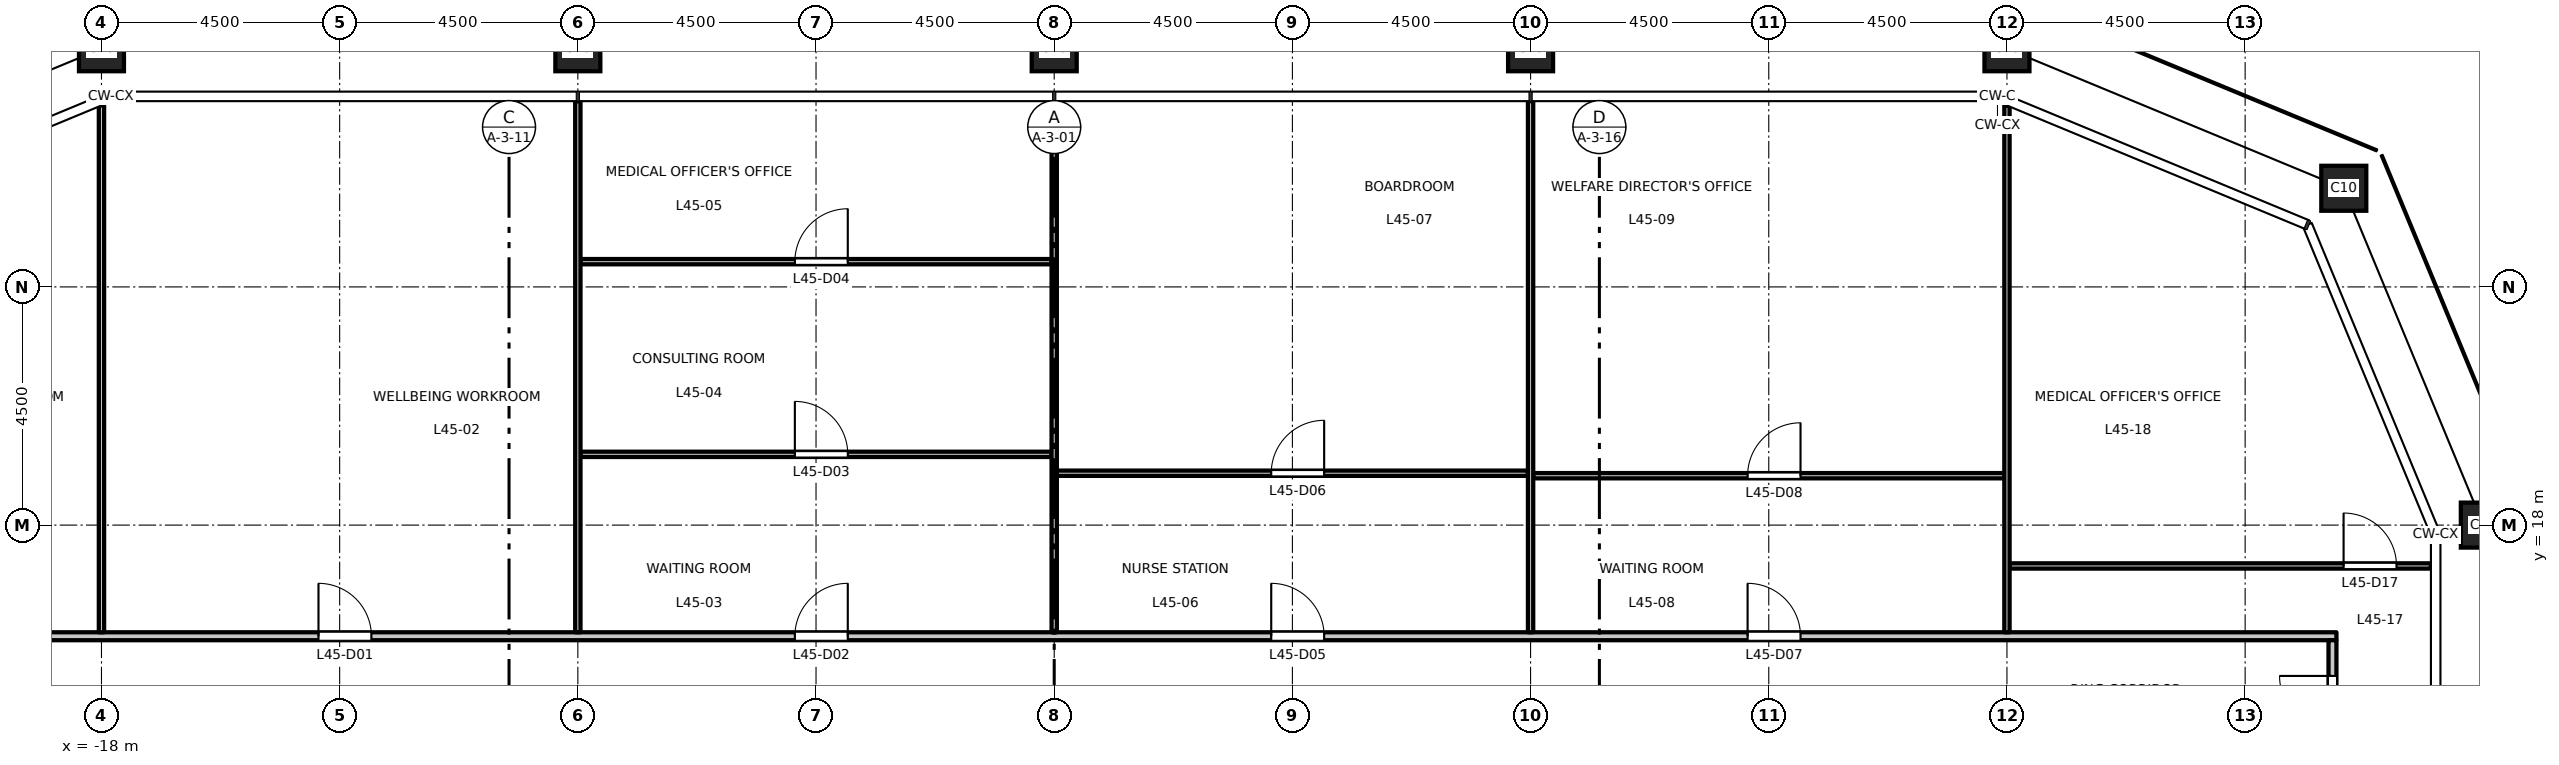
"""IFC4 building model, lengths in metres.
Left out: names, types, materials, properties, quantities, classifications, styles, units other than length and angle.
Written with IfcOpenShell. Run it as: python <this file> out.ifc"""

import sys

from ifc_helpers import new_model, si_unit, direction, frame, frame_2d, origin, origin_2d, place, context, subcontext, project, spatial, rectangle, hollow_rectangle, extrude, element, fill, save


model = new_model("IFC4")
c1 = context("Model", 3, precision=1e-05, world=origin(), true_north=direction((0.0, 1.0)))
c2 = subcontext(c1, "Body", "Model", "MODEL_VIEW")
j1 = project(units=[si_unit("LENGTHUNIT", "METRE"), si_unit("PLANEANGLEUNIT", "RADIAN")], contexts=[c1])
p1 = place(None, origin())
s1 = spatial("IfcSite", under=j1, at=p1, CompositionType="ELEMENT")
p2 = place(p1, origin())
s2 = spatial("IfcBuilding", under=s1, at=p2, CompositionType="ELEMENT")
p3 = place(p2, frame((0.0, 0.0, 210.7)))
s3 = spatial("IfcBuildingStorey", under=s2, at=p3, CompositionType="ELEMENT", Elevation=210.7)
for number, where, z_axis, x_axis in (
    (1, (27.0, 18.0, 0.0), (0.0, 0.0, 1.0), (1.0, 0.0, 0.0)),
    (2, (24.364, 24.364, 0.0), (0.0, 0.0, 1.0), (1.0, 0.0, 0.0)),
    (3, (18.0, 27.0, 0.0), (0.0, 0.0, 1.0), (1.0, 0.0, 0.0)),
    (4, (9.0, 27.0, 0.0), (0.0, 0.0, 1.0), (1.0, 0.0, 0.0)),
    (5, (0.0, 27.0, 0.0), (0.0, 0.0, 1.0), (1.0, 0.0, 0.0)),
    (6, (-9.0, 27.0, 0.0), (0.0, 0.0, 1.0), (1.0, 0.0, 0.0)),
    (7, (-18.0, 27.0, 0.0), (0.0, 0.0, 1.0), (1.0, 0.0, 0.0)),
):
    element("IfcColumn", number, at=place(p3, frame(where, z_axis=z_axis, x_axis=x_axis)), inside=s3, PredefinedType="COLUMN", context=c2, shape_type="SweptSolid", body=[
        extrude(hollow_rectangle(XDim=0.85, YDim=0.85, WallThickness=0.05, at=origin_2d()), origin(), (0.0, 0.0, 1.0), 4.5),
    ])
p4 = place(p3, frame((-24.225, 15.9, 0.0), z_axis=(0.0, 0.0, 1.0), x_axis=(1.0, 0.0, 0.0)))
e8 = element("IfcWall", 8, at=p4, inside=s3, PredefinedType="PARTITIONING", context=c2, shape_type="SweptSolid", body=[
    extrude(rectangle(XDim=48.45, YDim=0.15, at=frame_2d((24.225, 0.0))), origin(), (0.0, 0.0, 1.0), 4.35),
])
p5 = place(p4, frame((10.325, 0.0, 0.0)))
e9 = element("IfcOpeningElement", 9, at=p5, cuts=e8, PredefinedType="OPENING", context=c2, shape_type="SweptSolid", body=[
    extrude(rectangle(XDim=1.0, YDim=2.1, at=frame_2d((0.5, 1.05))), frame((0.0, 0.085, 0.0), z_axis=(0.0, -1.0, 0.0), x_axis=(1.0, 0.0, 0.0)), (0.0, 0.0, 1.0), 0.17),
])
p6 = place(p4, frame((19.325, 0.0, 0.0)))
e10 = element("IfcOpeningElement", 10, at=p6, cuts=e8, PredefinedType="OPENING", context=c2, shape_type="SweptSolid", body=[
    extrude(rectangle(XDim=1.0, YDim=2.1, at=frame_2d((0.5, 1.05))), frame((0.0, 0.085, 0.0), z_axis=(0.0, -1.0, 0.0), x_axis=(1.0, 0.0, 0.0)), (0.0, 0.0, 1.0), 0.17),
])
p7 = place(p4, frame((28.325, 0.0, 0.0)))
e11 = element("IfcOpeningElement", 11, at=p7, cuts=e8, PredefinedType="OPENING", context=c2, shape_type="SweptSolid", body=[
    extrude(rectangle(XDim=1.0, YDim=2.1, at=frame_2d((0.5, 1.05))), frame((0.0, 0.085, 0.0), z_axis=(0.0, -1.0, 0.0), x_axis=(1.0, 0.0, 0.0)), (0.0, 0.0, 1.0), 0.17),
])
p8 = place(p4, frame((37.325, 0.0, 0.0)))
e12 = element("IfcOpeningElement", 12, at=p8, cuts=e8, PredefinedType="OPENING", context=c2, shape_type="SweptSolid", body=[
    extrude(rectangle(XDim=1.0, YDim=2.1, at=frame_2d((0.5, 1.05))), frame((0.0, 0.085, 0.0), z_axis=(0.0, -1.0, 0.0), x_axis=(1.0, 0.0, 0.0)), (0.0, 0.0, 1.0), 0.17),
])
p9 = place(p4, frame((2.575, 0.0, 0.0)))
e13 = element("IfcOpeningElement", 13, at=p9, cuts=e8, PredefinedType="OPENING", context=c2, shape_type="SweptSolid", body=[
    extrude(rectangle(XDim=1.0, YDim=2.1, at=frame_2d((0.5, 1.05))), frame((0.0, 0.085, 0.0), z_axis=(0.0, -1.0, 0.0), x_axis=(1.0, 0.0, 0.0)), (0.0, 0.0, 1.0), 0.17),
])
p10 = place(p3, frame((18.05, 17.228, 0.0), z_axis=(0.0, 0.0, 1.0), x_axis=(1.0, 0.0, 0.0)))
e14 = element("IfcWall", 14, at=p10, inside=s3, PredefinedType="PARTITIONING", context=c2, shape_type="SweptSolid", body=[
    extrude(rectangle(XDim=7.96, YDim=0.1, at=frame_2d((3.98, 0.0))), origin(), (0.0, 0.0, 1.0), 4.35),
])
p11 = place(p10, frame((6.31, 0.0, 0.0)))
e15 = element("IfcOpeningElement", 15, at=p11, cuts=e14, PredefinedType="OPENING", context=c2, shape_type="SweptSolid", body=[
    extrude(rectangle(XDim=1.0, YDim=2.1, at=frame_2d((0.5, 1.05))), frame((0.0, 0.06, 0.0), z_axis=(0.0, -1.0, 0.0), x_axis=(1.0, 0.0, 0.0)), (0.0, 0.0, 1.0), 0.12),
])
p12 = place(p3, frame((9.05, 18.933, 0.0), z_axis=(0.0, 0.0, 1.0), x_axis=(1.0, 0.0, 0.0)))
e16 = element("IfcWall", 16, at=p12, inside=s3, PredefinedType="PARTITIONING", context=c2, shape_type="SweptSolid", body=[
    extrude(rectangle(XDim=8.9, YDim=0.1, at=frame_2d((4.45, 0.0))), origin(), (0.0, 0.0, 1.0), 4.35),
])
p13 = place(p12, frame((4.05, 0.0, 0.0)))
e17 = element("IfcOpeningElement", 17, at=p13, cuts=e16, PredefinedType="OPENING", context=c2, shape_type="SweptSolid", body=[
    extrude(rectangle(XDim=1.0, YDim=2.1, at=frame_2d((0.5, 1.05))), frame((0.0, 0.06, 0.0), z_axis=(0.0, -1.0, 0.0), x_axis=(1.0, 0.0, 0.0)), (0.0, 0.0, 1.0), 0.12),
])
p14 = place(p3, frame((0.05, 18.98, 0.0), z_axis=(0.0, 0.0, 1.0), x_axis=(1.0, 0.0, 0.0)))
e18 = element("IfcWall", 18, at=p14, inside=s3, PredefinedType="PARTITIONING", context=c2, shape_type="SweptSolid", body=[
    extrude(rectangle(XDim=8.9, YDim=0.1, at=frame_2d((4.45, 0.0))), origin(), (0.0, 0.0, 1.0), 4.35),
])
p15 = place(p14, frame((4.05, 0.0, 0.0)))
e19 = element("IfcOpeningElement", 19, at=p15, cuts=e18, PredefinedType="OPENING", context=c2, shape_type="SweptSolid", body=[
    extrude(rectangle(XDim=1.0, YDim=2.1, at=frame_2d((0.5, 1.05))), frame((0.0, 0.06, 0.0), z_axis=(0.0, -1.0, 0.0), x_axis=(1.0, 0.0, 0.0)), (0.0, 0.0, 1.0), 0.12),
])
p16 = place(p3, frame((-8.95, 19.337, 0.0), z_axis=(0.0, 0.0, 1.0), x_axis=(1.0, 0.0, 0.0)))
e20 = element("IfcWall", 20, at=p16, inside=s3, PredefinedType="PARTITIONING", context=c2, shape_type="SweptSolid", body=[
    extrude(rectangle(XDim=8.9, YDim=0.1, at=frame_2d((4.45, 0.0))), origin(), (0.0, 0.0, 1.0), 4.35),
])
p17 = place(p16, frame((4.05, 0.0, 0.0)))
e21 = element("IfcOpeningElement", 21, at=p17, cuts=e20, PredefinedType="OPENING", context=c2, shape_type="SweptSolid", body=[
    extrude(rectangle(XDim=1.0, YDim=2.1, at=frame_2d((0.5, 1.05))), frame((0.0, 0.06, 0.0), z_axis=(0.0, -1.0, 0.0), x_axis=(1.0, 0.0, 0.0)), (0.0, 0.0, 1.0), 0.12),
])
p18 = place(p3, frame((-8.95, 22.977, 0.0), z_axis=(0.0, 0.0, 1.0), x_axis=(1.0, 0.0, 0.0)))
e22 = element("IfcWall", 22, at=p18, inside=s3, PredefinedType="PARTITIONING", context=c2, shape_type="SweptSolid", body=[
    extrude(rectangle(XDim=8.9, YDim=0.1, at=frame_2d((4.45, 0.0))), origin(), (0.0, 0.0, 1.0), 4.35),
])
p19 = place(p18, frame((4.05, 0.0, 0.0)))
e23 = element("IfcOpeningElement", 23, at=p19, cuts=e22, PredefinedType="OPENING", context=c2, shape_type="SweptSolid", body=[
    extrude(rectangle(XDim=1.0, YDim=2.1, at=frame_2d((0.5, 1.05))), frame((0.0, 0.06, 0.0), z_axis=(0.0, -1.0, 0.0), x_axis=(1.0, 0.0, 0.0)), (0.0, 0.0, 1.0), 0.12),
])
p20 = place(p3, frame((-18.0, 15.975, 0.0), z_axis=(0.0, 0.0, 1.0), x_axis=(0.0, 1.0, 0.0)))
e24 = element("IfcWall", 24, at=p20, inside=s3, PredefinedType="PARTITIONING", context=c2, shape_type="SweptSolid", body=[
    extrude(rectangle(XDim=9.953, YDim=0.1, at=frame_2d((4.977, 0.0))), origin(), (0.0, 0.0, 1.0), 3.65),
])
p21 = place(p3, frame((-9.0, 15.975, 0.0), z_axis=(0.0, 0.0, 1.0), x_axis=(0.0, 1.0, 0.0)))
e25 = element("IfcWall", 25, at=p21, inside=s3, PredefinedType="PARTITIONING", context=c2, shape_type="SweptSolid", body=[
    extrude(rectangle(XDim=10.035, YDim=0.1, at=frame_2d((5.018, 0.0))), origin(), (0.0, 0.0, 1.0), 3.65),
])
p22 = place(p3, frame((0.0, 15.975, 0.0), z_axis=(0.0, 0.0, 1.0), x_axis=(0.0, 1.0, 0.0)))
e26 = element("IfcWall", 26, at=p22, inside=s3, PredefinedType="PARTITIONING", context=c2, shape_type="SweptSolid", body=[
    extrude(rectangle(XDim=10.035, YDim=0.1, at=frame_2d((5.018, 0.0))), origin(), (0.0, 0.0, 1.0), 3.55),
])
p23 = place(p3, frame((9.0, 15.975, 0.0), z_axis=(0.0, 0.0, 1.0), x_axis=(0.0, 1.0, 0.0)))
e27 = element("IfcWall", 27, at=p23, inside=s3, PredefinedType="PARTITIONING", context=c2, shape_type="SweptSolid", body=[
    extrude(rectangle(XDim=10.035, YDim=0.1, at=frame_2d((5.018, 0.0))), origin(), (0.0, 0.0, 1.0), 3.65),
])
p24 = place(p3, frame((18.0, 15.975, 0.0), z_axis=(0.0, 0.0, 1.0), x_axis=(0.0, 1.0, 0.0)))
e28 = element("IfcWall", 28, at=p24, inside=s3, PredefinedType="PARTITIONING", context=c2, shape_type="SweptSolid", body=[
    extrude(rectangle(XDim=9.953, YDim=0.1, at=frame_2d((4.977, 0.0))), origin(), (0.0, 0.0, 1.0), 3.65),
])
p25 = place(p3, frame((24.15, -15.825, 0.0), z_axis=(0.0, 0.0, 1.0), x_axis=(0.0, 1.0, 0.0)))
e29 = element("IfcWall", 29, at=p25, inside=s3, PredefinedType="PARTITIONING", context=c2, shape_type="SweptSolid", body=[
    extrude(rectangle(XDim=31.65, YDim=0.15, at=frame_2d((15.825, 0.0))), origin(), (0.0, 0.0, 1.0), 4.35),
])
p26 = place(p25, frame((29.975, 0.0, 0.0)))
e30 = element("IfcOpeningElement", 30, at=p26, cuts=e29, PredefinedType="OPENING", context=c2, shape_type="SweptSolid", body=[
    extrude(rectangle(XDim=1.0, YDim=2.1, at=frame_2d((0.5, 1.05))), frame((0.0, 0.085, 0.0), z_axis=(0.0, -1.0, 0.0), x_axis=(1.0, 0.0, 0.0)), (0.0, 0.0, 1.0), 0.17),
])
p27 = place(p25, frame((3.975, 0.0, 0.0)))
e31 = element("IfcOpeningElement", 31, at=p27, cuts=e29, PredefinedType="OPENING", context=c2, shape_type="SweptSolid", body=[
    extrude(rectangle(XDim=1.0, YDim=2.1, at=frame_2d((0.5, 1.05))), frame((0.0, 0.085, 0.0), z_axis=(0.0, -1.0, 0.0), x_axis=(1.0, 0.0, 0.0)), (0.0, 0.0, 1.0), 0.17),
])
p28 = place(p25, frame((10.725, 0.0, 0.0)))
e32 = element("IfcOpeningElement", 32, at=p28, cuts=e29, PredefinedType="OPENING", context=c2, shape_type="SweptSolid", body=[
    extrude(rectangle(XDim=1.0, YDim=2.1, at=frame_2d((0.5, 1.05))), frame((0.0, 0.085, 0.0), z_axis=(0.0, -1.0, 0.0), x_axis=(1.0, 0.0, 0.0)), (0.0, 0.0, 1.0), 0.17),
])
p29 = place(p25, frame((19.725, 0.0, 0.0)))
e33 = element("IfcOpeningElement", 33, at=p29, cuts=e29, PredefinedType="OPENING", context=c2, shape_type="SweptSolid", body=[
    extrude(rectangle(XDim=1.0, YDim=2.1, at=frame_2d((0.5, 1.05))), frame((0.0, 0.085, 0.0), z_axis=(0.0, -1.0, 0.0), x_axis=(1.0, 0.0, 0.0)), (0.0, 0.0, 1.0), 0.17),
])
p30 = place(p25, frame((26.475, 0.0, 0.0)))
e34 = element("IfcOpeningElement", 34, at=p30, cuts=e29, PredefinedType="OPENING", context=c2, shape_type="SweptSolid", body=[
    extrude(rectangle(XDim=1.0, YDim=2.1, at=frame_2d((0.5, 1.05))), frame((0.0, 0.085, 0.0), z_axis=(0.0, -1.0, 0.0), x_axis=(1.0, 0.0, 0.0)), (0.0, 0.0, 1.0), 0.17),
])
p31 = place(p5, origin())
e35 = element("IfcDoor", 35, at=p31, inside=s3, OperationType="SINGLE_SWING_LEFT", PredefinedType="DOOR", context=c2, shape_type="SweptSolid", body=[
    extrude(rectangle(XDim=1.0, YDim=2.1, at=frame_2d((0.5, 1.05))), frame((0.0, 0.025, 0.0), z_axis=(0.0, -1.0, 0.0), x_axis=(1.0, 0.0, 0.0)), (0.0, 0.0, 1.0), 0.05),
])
fill(e9, e35)
p32 = place(p6, origin())
e36 = element("IfcDoor", 36, at=p32, inside=s3, OperationType="SINGLE_SWING_RIGHT", PredefinedType="DOOR", context=c2, shape_type="SweptSolid", body=[
    extrude(rectangle(XDim=1.0, YDim=2.1, at=frame_2d((0.5, 1.05))), frame((0.0, 0.025, 0.0), z_axis=(0.0, -1.0, 0.0), x_axis=(1.0, 0.0, 0.0)), (0.0, 0.0, 1.0), 0.05),
])
fill(e10, e36)
p33 = place(p17, origin())
e37 = element("IfcDoor", 37, at=p33, inside=s3, OperationType="SINGLE_SWING_LEFT", PredefinedType="DOOR", context=c2, shape_type="SweptSolid", body=[
    extrude(rectangle(XDim=1.0, YDim=2.1, at=frame_2d((0.5, 1.05))), frame((0.0, 0.025, 0.0), z_axis=(0.0, -1.0, 0.0), x_axis=(1.0, 0.0, 0.0)), (0.0, 0.0, 1.0), 0.05),
])
fill(e21, e37)
p34 = place(p19, origin())
e38 = element("IfcDoor", 38, at=p34, inside=s3, OperationType="SINGLE_SWING_RIGHT", PredefinedType="DOOR", context=c2, shape_type="SweptSolid", body=[
    extrude(rectangle(XDim=1.0, YDim=2.1, at=frame_2d((0.5, 1.05))), frame((0.0, 0.025, 0.0), z_axis=(0.0, -1.0, 0.0), x_axis=(1.0, 0.0, 0.0)), (0.0, 0.0, 1.0), 0.05),
])
fill(e23, e38)
p35 = place(p7, origin())
e39 = element("IfcDoor", 39, at=p35, inside=s3, OperationType="SINGLE_SWING_LEFT", PredefinedType="DOOR", context=c2, shape_type="SweptSolid", body=[
    extrude(rectangle(XDim=1.0, YDim=2.1, at=frame_2d((0.5, 1.05))), frame((0.0, 0.025, 0.0), z_axis=(0.0, -1.0, 0.0), x_axis=(1.0, 0.0, 0.0)), (0.0, 0.0, 1.0), 0.05),
])
fill(e11, e39)
p36 = place(p15, origin())
e40 = element("IfcDoor", 40, at=p36, inside=s3, OperationType="SINGLE_SWING_RIGHT", PredefinedType="DOOR", context=c2, shape_type="SweptSolid", body=[
    extrude(rectangle(XDim=1.0, YDim=2.1, at=frame_2d((0.5, 1.05))), frame((0.0, 0.025, 0.0), z_axis=(0.0, -1.0, 0.0), x_axis=(1.0, 0.0, 0.0)), (0.0, 0.0, 1.0), 0.05),
])
fill(e19, e40)
p37 = place(p8, origin())
e41 = element("IfcDoor", 41, at=p37, inside=s3, OperationType="SINGLE_SWING_LEFT", PredefinedType="DOOR", context=c2, shape_type="SweptSolid", body=[
    extrude(rectangle(XDim=1.0, YDim=2.1, at=frame_2d((0.5, 1.05))), frame((0.0, 0.025, 0.0), z_axis=(0.0, -1.0, 0.0), x_axis=(1.0, 0.0, 0.0)), (0.0, 0.0, 1.0), 0.05),
])
fill(e12, e41)
p38 = place(p13, origin())
e42 = element("IfcDoor", 42, at=p38, inside=s3, OperationType="SINGLE_SWING_RIGHT", PredefinedType="DOOR", context=c2, shape_type="SweptSolid", body=[
    extrude(rectangle(XDim=1.0, YDim=2.1, at=frame_2d((0.5, 1.05))), frame((0.0, 0.025, 0.0), z_axis=(0.0, -1.0, 0.0), x_axis=(1.0, 0.0, 0.0)), (0.0, 0.0, 1.0), 0.05),
])
fill(e17, e42)
p39 = place(p26, origin())
e43 = element("IfcDoor", 43, at=p39, inside=s3, OperationType="SINGLE_SWING_RIGHT", PredefinedType="DOOR", context=c2, shape_type="SweptSolid", body=[
    extrude(rectangle(XDim=1.0, YDim=2.1, at=frame_2d((0.5, 1.05))), frame((0.0, 0.025, 0.0), z_axis=(0.0, -1.0, 0.0), x_axis=(1.0, 0.0, 0.0)), (0.0, 0.0, 1.0), 0.05),
])
fill(e30, e43)
p40 = place(p11, origin())
e44 = element("IfcDoor", 44, at=p40, inside=s3, OperationType="SINGLE_SWING_LEFT", PredefinedType="DOOR", context=c2, shape_type="SweptSolid", body=[
    extrude(rectangle(XDim=1.0, YDim=2.1, at=frame_2d((0.5, 1.05))), frame((0.0, 0.025, 0.0), z_axis=(0.0, -1.0, 0.0), x_axis=(1.0, 0.0, 0.0)), (0.0, 0.0, 1.0), 0.05),
])
fill(e15, e44)
save(model, sys.argv[1])
